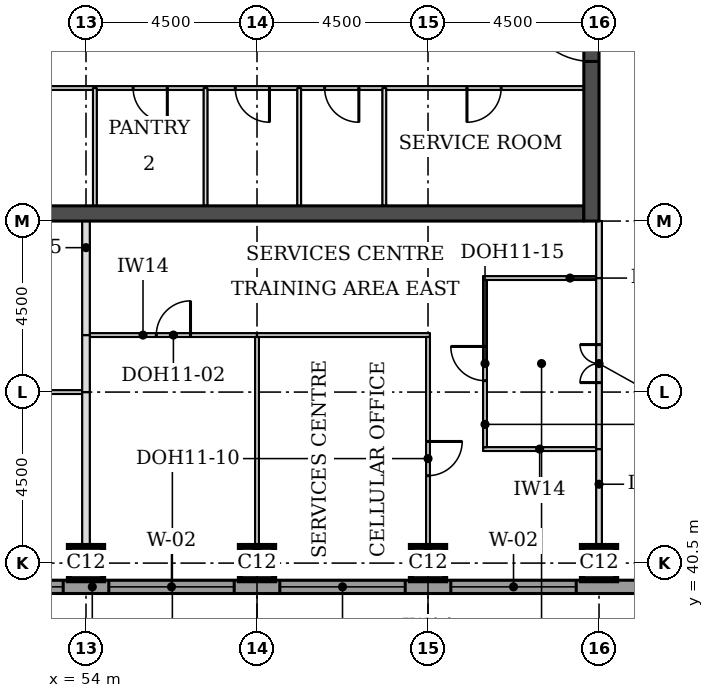
"""IFC4 building model, lengths in metres.
Left out: names, types, materials, properties, quantities, classifications, styles, units other than length and angle.
Written with IfcOpenShell. Run it as: python <this file> out.ifc"""

import sys

from ifc_helpers import new_model, si_unit, direction, frame, frame_2d, origin, origin_2d, place, context, subcontext, project, spatial, rectangle, extrude, element, fill, save


model = new_model("IFC4")
c1 = context("Model", 3, precision=1e-05, world=origin(), true_north=direction((0.0, 1.0)))
c2 = subcontext(c1, "Body", "Model", "MODEL_VIEW")
j1 = project(units=[si_unit("LENGTHUNIT", "METRE"), si_unit("PLANEANGLEUNIT", "RADIAN")], contexts=[c1])
p1 = place(None, origin())
s1 = spatial("IfcSite", under=j1, at=p1, CompositionType="ELEMENT")
p2 = place(p1, origin())
s2 = spatial("IfcBuilding", under=s1, at=p2, CompositionType="ELEMENT")
p3 = place(p2, frame((0.0, 0.0, 234.1)))
s3 = spatial("IfcBuildingStorey", under=s2, at=p3, CompositionType="ELEMENT", Elevation=234.1)
for number, where, z_axis, x_axis in (
    (1, (54.0, 40.5, 0.0), (0.0, 0.0, 1.0), (1.0, 0.0, 0.0)),
    (2, (58.5, 40.5, 0.0), (0.0, 0.0, 1.0), (1.0, 0.0, 0.0)),
    (3, (63.0, 40.5, 0.0), (0.0, 0.0, 1.0), (1.0, 0.0, 0.0)),
    (4, (67.5, 40.5, 0.0), (0.0, 0.0, 1.0), (1.0, 0.0, 0.0)),
):
    element("IfcColumn", number, at=place(p3, frame(where, z_axis=z_axis, x_axis=x_axis)), inside=s3, PredefinedType="COLUMN", context=c2, shape_type="SweptSolid", body=[
        extrude(rectangle(XDim=0.9, YDim=0.9, at=origin_2d()), origin(), (0.0, 0.0, 1.0), 3.7),
    ])
p4 = place(p3, frame((45.4, 49.7, 0.0), z_axis=(0.0, 0.0, 1.0), x_axis=(1.0, 0.0, 0.0)))
e5 = element("IfcWall", 5, at=p4, inside=s3, PredefinedType="SHEAR", context=c2, shape_type="SweptSolid", body=[
    extrude(rectangle(XDim=21.7, YDim=0.4, at=frame_2d((10.85, 0.0))), origin(), (0.0, 0.0, 1.0), 3.7),
])
p5 = place(p3, frame((67.3, 49.5, 0.0), z_axis=(0.0, 0.0, 1.0), x_axis=(0.0, 1.0, 0.0)))
e6 = element("IfcWall", 6, at=p5, inside=s3, PredefinedType="SHEAR", context=c2, shape_type="SweptSolid", body=[
    extrude(rectangle(XDim=22.5, YDim=0.4, at=frame_2d((11.25, 0.0))), origin(), (0.0, 0.0, 1.0), 3.7),
])
p6 = place(p5, frame((4.2, 0.0, 0.0)))
e7 = element("IfcOpeningElement", 7, at=p6, cuts=e6, PredefinedType="OPENING", context=c2, shape_type="SweptSolid", body=[
    extrude(rectangle(XDim=1.8, YDim=2.1, at=frame_2d((0.9, 1.05))), frame((0.0, 0.21, 0.0), z_axis=(0.0, -1.0, 0.0), x_axis=(1.0, 0.0, 0.0)), (0.0, 0.0, 1.0), 0.42),
])
p7 = place(p5, frame((6.9, 0.0, 0.0)))
e8 = element("IfcOpeningElement", 8, at=p7, cuts=e6, PredefinedType="OPENING", context=c2, shape_type="SweptSolid", body=[
    extrude(rectangle(XDim=1.1, YDim=2.1, at=frame_2d((0.55, 1.05))), frame((0.0, 0.21, 0.0), z_axis=(0.0, -1.0, 0.0), x_axis=(1.0, 0.0, 0.0)), (0.0, 0.0, 1.0), 0.42),
])
p8 = place(p5, frame((13.6, 0.0, 0.0)))
e9 = element("IfcOpeningElement", 9, at=p8, cuts=e6, PredefinedType="OPENING", context=c2, shape_type="SweptSolid", body=[
    extrude(rectangle(XDim=1.1, YDim=2.1, at=frame_2d((0.55, 1.05))), frame((0.0, 0.21, 0.0), z_axis=(0.0, -1.0, 0.0), x_axis=(1.0, 0.0, 0.0)), (0.0, 0.0, 1.0), 0.42),
])
p9 = place(p5, frame((16.5, 0.0, 0.0)))
e10 = element("IfcOpeningElement", 10, at=p9, cuts=e6, PredefinedType="OPENING", context=c2, shape_type="SweptSolid", body=[
    extrude(rectangle(XDim=1.8, YDim=2.1, at=frame_2d((0.9, 1.05))), frame((0.0, 0.21, 0.0), z_axis=(0.0, -1.0, 0.0), x_axis=(1.0, 0.0, 0.0)), (0.0, 0.0, 1.0), 0.42),
])
p10 = place(p3, frame((36.0, 39.875, 0.0), z_axis=(0.0, 0.0, 1.0), x_axis=(1.0, 0.0, 0.0)))
e11 = element("IfcWall", 11, at=p10, inside=s3, PredefinedType="STANDARD", context=c2, shape_type="SweptSolid", body=[
    extrude(rectangle(XDim=36.331, YDim=0.35, at=frame_2d((18.166, 0.0))), origin(), (0.0, 0.0, 1.0), 3.525),
])
p11 = place(p10, frame((5.1, 0.0, 0.9)))
e12 = element("IfcOpeningElement", 12, at=p11, cuts=e11, PredefinedType="OPENING", context=c2, shape_type="SweptSolid", body=[
    extrude(rectangle(XDim=3.3, YDim=1.9, at=frame_2d((1.65, 0.95))), frame((0.0, 0.185, 0.0), z_axis=(0.0, -1.0, 0.0), x_axis=(1.0, 0.0, 0.0)), (0.0, 0.0, 1.0), 0.37),
])
p12 = place(p10, frame((9.6, 0.0, 0.9)))
e13 = element("IfcOpeningElement", 13, at=p12, cuts=e11, PredefinedType="OPENING", context=c2, shape_type="SweptSolid", body=[
    extrude(rectangle(XDim=3.3, YDim=1.9, at=frame_2d((1.65, 0.95))), frame((0.0, 0.185, 0.0), z_axis=(0.0, -1.0, 0.0), x_axis=(1.0, 0.0, 0.0)), (0.0, 0.0, 1.0), 0.37),
])
p13 = place(p10, frame((14.1, 0.0, 0.9)))
e14 = element("IfcOpeningElement", 14, at=p13, cuts=e11, PredefinedType="OPENING", context=c2, shape_type="SweptSolid", body=[
    extrude(rectangle(XDim=3.3, YDim=1.9, at=frame_2d((1.65, 0.95))), frame((0.0, 0.185, 0.0), z_axis=(0.0, -1.0, 0.0), x_axis=(1.0, 0.0, 0.0)), (0.0, 0.0, 1.0), 0.37),
])
p14 = place(p10, frame((18.6, 0.0, 0.9)))
e15 = element("IfcOpeningElement", 15, at=p14, cuts=e11, PredefinedType="OPENING", context=c2, shape_type="SweptSolid", body=[
    extrude(rectangle(XDim=3.3, YDim=1.9, at=frame_2d((1.65, 0.95))), frame((0.0, 0.185, 0.0), z_axis=(0.0, -1.0, 0.0), x_axis=(1.0, 0.0, 0.0)), (0.0, 0.0, 1.0), 0.37),
])
p15 = place(p10, frame((23.1, 0.0, 0.9)))
e16 = element("IfcOpeningElement", 16, at=p15, cuts=e11, PredefinedType="OPENING", context=c2, shape_type="SweptSolid", body=[
    extrude(rectangle(XDim=3.3, YDim=1.9, at=frame_2d((1.65, 0.95))), frame((0.0, 0.185, 0.0), z_axis=(0.0, -1.0, 0.0), x_axis=(1.0, 0.0, 0.0)), (0.0, 0.0, 1.0), 0.37),
])
p16 = place(p10, frame((27.6, 0.0, 0.9)))
e17 = element("IfcOpeningElement", 17, at=p16, cuts=e11, PredefinedType="OPENING", context=c2, shape_type="SweptSolid", body=[
    extrude(rectangle(XDim=3.3, YDim=1.9, at=frame_2d((1.65, 0.95))), frame((0.0, 0.185, 0.0), z_axis=(0.0, -1.0, 0.0), x_axis=(1.0, 0.0, 0.0)), (0.0, 0.0, 1.0), 0.37),
])
p17 = place(p3, frame((64.45, 43.5, 0.0), z_axis=(0.0, 0.0, 1.0), x_axis=(1.0, 0.0, 0.0)))
e18 = element("IfcWall", 18, at=p17, inside=s3, PredefinedType="PARTITIONING", context=c2, shape_type="SweptSolid", body=[
    extrude(rectangle(XDim=2.975, YDim=0.1, at=frame_2d((1.488, 0.0))), origin(), (0.0, 0.0, 1.0), 3.55),
])
p18 = place(p3, frame((49.45, 45.0, 0.0), z_axis=(0.0, 0.0, 1.0), x_axis=(1.0, 0.0, 0.0)))
e19 = element("IfcWall", 19, at=p18, inside=s3, PredefinedType="PARTITIONING", context=c2, shape_type="SweptSolid", body=[
    extrude(rectangle(XDim=4.45, YDim=0.1, at=frame_2d((2.225, 0.0))), origin(), (0.0, 0.0, 1.0), 3.55),
])
p19 = place(p3, frame((54.1, 46.5, 0.0), z_axis=(0.0, 0.0, 1.0), x_axis=(1.0, 0.0, 0.0)))
e20 = element("IfcWall", 20, at=p19, inside=s3, PredefinedType="PARTITIONING", context=c2, shape_type="SweptSolid", body=[
    extrude(rectangle(XDim=4.4, YDim=0.1, at=frame_2d((2.2, 0.0))), origin(), (0.0, 0.0, 1.0), 3.55),
])
p20 = place(p19, frame((1.75, 0.0, 0.0)))
e21 = element("IfcOpeningElement", 21, at=p20, cuts=e20, PredefinedType="OPENING", context=c2, shape_type="SweptSolid", body=[
    extrude(rectangle(XDim=0.9, YDim=2.1, at=frame_2d((0.45, 1.05))), frame((0.0, 0.06, 0.0), z_axis=(0.0, -1.0, 0.0), x_axis=(1.0, 0.0, 0.0)), (0.0, 0.0, 1.0), 0.12),
])
p21 = place(p3, frame((58.5, 46.5, 0.0), z_axis=(0.0, 0.0, 1.0), x_axis=(1.0, 0.0, 0.0)))
e22 = element("IfcWall", 22, at=p21, inside=s3, PredefinedType="PARTITIONING", context=c2, shape_type="SweptSolid", body=[
    extrude(rectangle(XDim=4.55, YDim=0.1, at=frame_2d((2.275, 0.0))), origin(), (0.0, 0.0, 1.0), 3.55),
])
p22 = place(p3, frame((64.45, 48.0, 0.0), z_axis=(0.0, 0.0, 1.0), x_axis=(1.0, 0.0, 0.0)))
e23 = element("IfcWall", 23, at=p22, inside=s3, PredefinedType="PARTITIONING", context=c2, shape_type="SweptSolid", body=[
    extrude(rectangle(XDim=2.975, YDim=0.1, at=frame_2d((1.488, 0.0))), origin(), (0.0, 0.0, 1.0), 3.55),
])
p23 = place(p3, frame((54.0, 40.05, 0.0), z_axis=(0.0, 0.0, 1.0), x_axis=(0.0, 1.0, 0.0)))
e24 = element("IfcWall", 24, at=p23, inside=s3, PredefinedType="PARTITIONING", context=c2, shape_type="SweptSolid", body=[
    extrude(rectangle(XDim=4.95, YDim=0.2, at=frame_2d((2.475, 0.0))), origin(), (0.0, 0.0, 1.0), 3.55),
])
p24 = place(p3, frame((58.5, 40.05, 0.0), z_axis=(0.0, 0.0, 1.0), x_axis=(0.0, 1.0, 0.0)))
e25 = element("IfcWall", 25, at=p24, inside=s3, PredefinedType="PARTITIONING", context=c2, shape_type="SweptSolid", body=[
    extrude(rectangle(XDim=6.4, YDim=0.1, at=frame_2d((3.2, 0.0))), origin(), (0.0, 0.0, 1.0), 3.55),
])
p25 = place(p3, frame((63.0, 40.05, 0.0), z_axis=(0.0, 0.0, 1.0), x_axis=(0.0, 1.0, 0.0)))
e26 = element("IfcWall", 26, at=p25, inside=s3, PredefinedType="PARTITIONING", context=c2, shape_type="SweptSolid", body=[
    extrude(rectangle(XDim=6.4, YDim=0.1, at=frame_2d((3.2, 0.0))), origin(), (0.0, 0.0, 1.0), 3.55),
])
p26 = place(p25, frame((2.75, 0.0, 0.0)))
e27 = element("IfcOpeningElement", 27, at=p26, cuts=e26, PredefinedType="OPENING", context=c2, shape_type="SweptSolid", body=[
    extrude(rectangle(XDim=0.9, YDim=2.1, at=frame_2d((0.45, 1.05))), frame((0.0, 0.06, 0.0), z_axis=(0.0, -1.0, 0.0), x_axis=(1.0, 0.0, 0.0)), (0.0, 0.0, 1.0), 0.12),
])
p27 = place(p3, frame((67.5, 40.05, 0.0), z_axis=(0.0, 0.0, 1.0), x_axis=(0.0, 1.0, 0.0)))
e28 = element("IfcWall", 28, at=p27, inside=s3, PredefinedType="PARTITIONING", context=c2, shape_type="SweptSolid", body=[
    extrude(rectangle(XDim=3.45, YDim=0.15, at=frame_2d((1.725, 0.0))), origin(), (0.0, 0.0, 1.0), 3.022),
])
p28 = place(p3, frame((67.5, 43.5, 0.0), z_axis=(0.0, 0.0, 1.0), x_axis=(0.0, 1.0, 0.0)))
e29 = element("IfcWall", 29, at=p28, inside=s3, PredefinedType="PARTITIONING", context=c2, shape_type="SweptSolid", body=[
    extrude(rectangle(XDim=4.5, YDim=0.15, at=frame_2d((2.25, 0.0))), origin(), (0.0, 0.0, 1.0), 3.022),
])
p29 = place(p28, frame((1.75, 0.0, 0.0)))
e30 = element("IfcOpeningElement", 30, at=p29, cuts=e29, PredefinedType="OPENING", context=c2, shape_type="SweptSolid", body=[
    extrude(rectangle(XDim=1.0, YDim=2.1, at=frame_2d((0.5, 1.05))), frame((0.0, 0.085, 0.0), z_axis=(0.0, -1.0, 0.0), x_axis=(1.0, 0.0, 0.0)), (0.0, 0.0, 1.0), 0.17),
])
p30 = place(p3, frame((64.5, 43.55, 0.0), z_axis=(0.0, 0.0, 1.0), x_axis=(0.0, 1.0, 0.0)))
e31 = element("IfcWall", 31, at=p30, inside=s3, PredefinedType="PARTITIONING", context=c2, shape_type="SweptSolid", body=[
    extrude(rectangle(XDim=4.4, YDim=0.1, at=frame_2d((2.2, 0.0))), origin(), (0.0, 0.0, 1.0), 3.55),
])
p31 = place(p30, frame((1.75, 0.0, 0.0)))
e32 = element("IfcOpeningElement", 32, at=p31, cuts=e31, PredefinedType="OPENING", context=c2, shape_type="SweptSolid", body=[
    extrude(rectangle(XDim=0.9, YDim=2.1, at=frame_2d((0.45, 1.05))), frame((0.0, 0.06, 0.0), z_axis=(0.0, -1.0, 0.0), x_axis=(1.0, 0.0, 0.0)), (0.0, 0.0, 1.0), 0.12),
])
p32 = place(p3, frame((54.0, 45.0, 0.0), z_axis=(0.0, 0.0, 1.0), x_axis=(0.0, 1.0, 0.0)))
e33 = element("IfcWall", 33, at=p32, inside=s3, PredefinedType="PARTITIONING", context=c2, shape_type="SweptSolid", body=[
    extrude(rectangle(XDim=1.5, YDim=0.2, at=frame_2d((0.75, 0.0))), origin(), (0.0, 0.0, 1.0), 3.55),
])
p33 = place(p3, frame((54.0, 46.5, 0.0), z_axis=(0.0, 0.0, 1.0), x_axis=(0.0, 1.0, 0.0)))
e34 = element("IfcWall", 34, at=p33, inside=s3, PredefinedType="PARTITIONING", context=c2, shape_type="SweptSolid", body=[
    extrude(rectangle(XDim=3.0, YDim=0.2, at=frame_2d((1.5, 0.0))), origin(), (0.0, 0.0, 1.0), 3.55),
])
p34 = place(p3, frame((67.5, 48.0, 0.0), z_axis=(0.0, 0.0, 1.0), x_axis=(0.0, 1.0, 0.0)))
e35 = element("IfcWall", 35, at=p34, inside=s3, PredefinedType="PARTITIONING", context=c2, shape_type="SweptSolid", body=[
    extrude(rectangle(XDim=1.5, YDim=0.15, at=frame_2d((0.75, 0.0))), origin(), (0.0, 0.0, 1.0), 3.022),
])
p35 = place(p3, frame((45.4, 53.0, 0.0), z_axis=(0.0, 0.0, 1.0), x_axis=(1.0, 0.0, 0.0)))
e36 = element("IfcWall", 36, at=p35, inside=s3, PredefinedType="PARTITIONING", context=c2, shape_type="SweptSolid", body=[
    extrude(rectangle(XDim=21.7, YDim=0.1, at=frame_2d((10.85, 0.0))), origin(), (0.0, 0.0, 1.0), 3.55),
])
p36 = place(p35, frame((18.625, 0.0, 0.0)))
e37 = element("IfcOpeningElement", 37, at=p36, cuts=e36, PredefinedType="OPENING", context=c2, shape_type="SweptSolid", body=[
    extrude(rectangle(XDim=0.9, YDim=2.1, at=frame_2d((0.45, 1.05))), frame((0.0, 0.06, 0.0), z_axis=(0.0, -1.0, 0.0), x_axis=(1.0, 0.0, 0.0)), (0.0, 0.0, 1.0), 0.12),
])
p37 = place(p35, frame((0.393, 0.0, 0.0)))
e38 = element("IfcOpeningElement", 38, at=p37, cuts=e36, PredefinedType="OPENING", context=c2, shape_type="SweptSolid", body=[
    extrude(rectangle(XDim=1.0, YDim=2.1, at=frame_2d((0.5, 1.05))), frame((0.0, 0.06, 0.0), z_axis=(0.0, -1.0, 0.0), x_axis=(1.0, 0.0, 0.0)), (0.0, 0.0, 1.0), 0.12),
])
p38 = place(p35, frame((2.201, 0.0, 0.0)))
e39 = element("IfcOpeningElement", 39, at=p38, cuts=e36, PredefinedType="OPENING", context=c2, shape_type="SweptSolid", body=[
    extrude(rectangle(XDim=0.9, YDim=2.1, at=frame_2d((0.45, 1.05))), frame((0.0, 0.06, 0.0), z_axis=(0.0, -1.0, 0.0), x_axis=(1.0, 0.0, 0.0)), (0.0, 0.0, 1.0), 0.12),
])
p39 = place(p35, frame((3.934, 0.0, 0.0)))
e40 = element("IfcOpeningElement", 40, at=p39, cuts=e36, PredefinedType="OPENING", context=c2, shape_type="SweptSolid", body=[
    extrude(rectangle(XDim=0.9, YDim=2.1, at=frame_2d((0.45, 1.05))), frame((0.0, 0.06, 0.0), z_axis=(0.0, -1.0, 0.0), x_axis=(1.0, 0.0, 0.0)), (0.0, 0.0, 1.0), 0.12),
])
p40 = place(p35, frame((6.592, 0.0, 0.0)))
e41 = element("IfcOpeningElement", 41, at=p40, cuts=e36, PredefinedType="OPENING", context=c2, shape_type="SweptSolid", body=[
    extrude(rectangle(XDim=0.9, YDim=2.1, at=frame_2d((0.45, 1.05))), frame((0.0, 0.06, 0.0), z_axis=(0.0, -1.0, 0.0), x_axis=(1.0, 0.0, 0.0)), (0.0, 0.0, 1.0), 0.12),
])
p41 = place(p35, frame((9.84, 0.0, 0.0)))
e42 = element("IfcOpeningElement", 42, at=p41, cuts=e36, PredefinedType="OPENING", context=c2, shape_type="SweptSolid", body=[
    extrude(rectangle(XDim=0.9, YDim=2.1, at=frame_2d((0.45, 1.05))), frame((0.0, 0.06, 0.0), z_axis=(0.0, -1.0, 0.0), x_axis=(1.0, 0.0, 0.0)), (0.0, 0.0, 1.0), 0.12),
])
p42 = place(p35, frame((12.528, 0.0, 0.0)))
e43 = element("IfcOpeningElement", 43, at=p42, cuts=e36, PredefinedType="OPENING", context=c2, shape_type="SweptSolid", body=[
    extrude(rectangle(XDim=0.9, YDim=2.1, at=frame_2d((0.45, 1.05))), frame((0.0, 0.06, 0.0), z_axis=(0.0, -1.0, 0.0), x_axis=(1.0, 0.0, 0.0)), (0.0, 0.0, 1.0), 0.12),
])
p43 = place(p35, frame((14.88, 0.0, 0.0)))
e44 = element("IfcOpeningElement", 44, at=p43, cuts=e36, PredefinedType="OPENING", context=c2, shape_type="SweptSolid", body=[
    extrude(rectangle(XDim=0.9, YDim=2.1, at=frame_2d((0.45, 1.05))), frame((0.0, 0.06, 0.0), z_axis=(0.0, -1.0, 0.0), x_axis=(1.0, 0.0, 0.0)), (0.0, 0.0, 1.0), 0.12),
])
for number, where, z_axis, x_axis in (
    (45, (54.234, 49.9, 0.0), (0.0, 0.0, 1.0), (0.0, 1.0, 0.0)),
    (46, (57.146, 49.9, 0.0), (0.0, 0.0, 1.0), (0.0, 1.0, 0.0)),
    (47, (59.61, 49.9, 0.0), (0.0, 0.0, 1.0), (0.0, 1.0, 0.0)),
    (48, (61.85, 49.9, 0.0), (0.0, 0.0, 1.0), (0.0, 1.0, 0.0)),
):
    element("IfcWall", number, at=place(p3, frame(where, z_axis=z_axis, x_axis=x_axis)), inside=s3, PredefinedType="PARTITIONING", context=c2, shape_type="SweptSolid", body=[
        extrude(rectangle(XDim=3.1, YDim=0.1, at=frame_2d((1.55, 0.0))), origin(), (0.0, 0.0, 1.0), 3.55),
    ])
p44 = place(p13, origin())
e49 = element("IfcWindow", 49, at=p44, inside=s3, PartitioningType="SINGLE_PANEL", PredefinedType="WINDOW", context=c2, shape_type="SweptSolid", body=[
    extrude(rectangle(XDim=3.3, YDim=1.9, at=frame_2d((1.65, 0.95))), frame((0.0, 0.085, 0.0), z_axis=(0.0, -1.0, 0.0), x_axis=(1.0, 0.0, 0.0)), (0.0, 0.0, 1.0), 0.06),
])
fill(e14, e49)
p45 = place(p14, origin())
e50 = element("IfcWindow", 50, at=p45, inside=s3, PartitioningType="SINGLE_PANEL", PredefinedType="WINDOW", context=c2, shape_type="SweptSolid", body=[
    extrude(rectangle(XDim=3.3, YDim=1.9, at=frame_2d((1.65, 0.95))), frame((0.0, 0.085, 0.0), z_axis=(0.0, -1.0, 0.0), x_axis=(1.0, 0.0, 0.0)), (0.0, 0.0, 1.0), 0.06),
])
fill(e15, e50)
p46 = place(p15, origin())
e51 = element("IfcWindow", 51, at=p46, inside=s3, PartitioningType="SINGLE_PANEL", PredefinedType="WINDOW", context=c2, shape_type="SweptSolid", body=[
    extrude(rectangle(XDim=3.3, YDim=1.9, at=frame_2d((1.65, 0.95))), frame((0.0, 0.085, 0.0), z_axis=(0.0, -1.0, 0.0), x_axis=(1.0, 0.0, 0.0)), (0.0, 0.0, 1.0), 0.06),
])
fill(e16, e51)
p47 = place(p16, origin())
e52 = element("IfcWindow", 52, at=p47, inside=s3, PartitioningType="SINGLE_PANEL", PredefinedType="WINDOW", context=c2, shape_type="SweptSolid", body=[
    extrude(rectangle(XDim=3.3, YDim=1.9, at=frame_2d((1.65, 0.95))), frame((0.0, 0.085, 0.0), z_axis=(0.0, -1.0, 0.0), x_axis=(1.0, 0.0, 0.0)), (0.0, 0.0, 1.0), 0.06),
])
fill(e17, e52)
p48 = place(p29, origin())
e53 = element("IfcDoor", 53, at=p48, inside=s3, OperationType="DOUBLE_DOOR_SINGLE_SWING", PredefinedType="DOOR", context=c2, shape_type="SweptSolid", body=[
    extrude(rectangle(XDim=1.0, YDim=2.1, at=frame_2d((0.5, 1.05))), frame((0.0, 0.025, 0.0), z_axis=(0.0, -1.0, 0.0), x_axis=(1.0, 0.0, 0.0)), (0.0, 0.0, 1.0), 0.05),
])
fill(e30, e53)
p49 = place(p31, origin())
e54 = element("IfcDoor", 54, at=p49, inside=s3, OperationType="SINGLE_SWING_RIGHT", PredefinedType="DOOR", context=c2, shape_type="SweptSolid", body=[
    extrude(rectangle(XDim=0.9, YDim=2.1, at=frame_2d((0.45, 1.05))), frame((0.0, 0.025, 0.0), z_axis=(0.0, -1.0, 0.0), x_axis=(1.0, 0.0, 0.0)), (0.0, 0.0, 1.0), 0.05),
])
fill(e32, e54)
p50 = place(p20, origin())
e55 = element("IfcDoor", 55, at=p50, inside=s3, OperationType="SINGLE_SWING_RIGHT", PredefinedType="DOOR", context=c2, shape_type="SweptSolid", body=[
    extrude(rectangle(XDim=0.9, YDim=2.1, at=frame_2d((0.45, 1.05))), frame((0.0, 0.025, 0.0), z_axis=(0.0, -1.0, 0.0), x_axis=(1.0, 0.0, 0.0)), (0.0, 0.0, 1.0), 0.05),
])
fill(e21, e55)
p51 = place(p26, frame((0.9, 0.0, 0.0), z_axis=(0.0, 0.0, 1.0), x_axis=(-1.0, 0.0, 0.0)))
e56 = element("IfcDoor", 56, at=p51, inside=s3, OperationType="SINGLE_SWING_LEFT", PredefinedType="DOOR", context=c2, shape_type="SweptSolid", body=[
    extrude(rectangle(XDim=0.9, YDim=2.1, at=frame_2d((0.45, 1.05))), frame((0.0, 0.025, 0.0), z_axis=(0.0, -1.0, 0.0), x_axis=(1.0, 0.0, 0.0)), (0.0, 0.0, 1.0), 0.05),
])
fill(e27, e56)
p52 = place(p6, origin())
e57 = element("IfcDoor", 57, at=p52, inside=s3, OperationType="SINGLE_SWING_RIGHT", PredefinedType="DOOR", context=c2, shape_type="SweptSolid", body=[
    extrude(rectangle(XDim=1.8, YDim=2.1, at=frame_2d((0.9, 1.05))), frame((0.0, 0.025, 0.0), z_axis=(0.0, -1.0, 0.0), x_axis=(1.0, 0.0, 0.0)), (0.0, 0.0, 1.0), 0.05),
])
fill(e7, e57)
p53 = place(p36, frame((0.9, 0.0, 0.0), z_axis=(0.0, 0.0, 1.0), x_axis=(-1.0, 0.0, 0.0)))
e58 = element("IfcDoor", 58, at=p53, inside=s3, OperationType="SINGLE_SWING_RIGHT", PredefinedType="DOOR", context=c2, shape_type="SweptSolid", body=[
    extrude(rectangle(XDim=0.9, YDim=2.1, at=frame_2d((0.45, 1.05))), frame((0.0, 0.025, 0.0), z_axis=(0.0, -1.0, 0.0), x_axis=(1.0, 0.0, 0.0)), (0.0, 0.0, 1.0), 0.05),
])
fill(e37, e58)
p54 = place(p41, frame((0.9, 0.0, 0.0), z_axis=(0.0, 0.0, 1.0), x_axis=(-1.0, 0.0, 0.0)))
e59 = element("IfcDoor", 59, at=p54, inside=s3, OperationType="SINGLE_SWING_LEFT", PredefinedType="DOOR", context=c2, shape_type="SweptSolid", body=[
    extrude(rectangle(XDim=0.9, YDim=2.1, at=frame_2d((0.45, 1.05))), frame((0.0, 0.025, 0.0), z_axis=(0.0, -1.0, 0.0), x_axis=(1.0, 0.0, 0.0)), (0.0, 0.0, 1.0), 0.05),
])
fill(e42, e59)
p55 = place(p42, frame((0.9, 0.0, 0.0), z_axis=(0.0, 0.0, 1.0), x_axis=(-1.0, 0.0, 0.0)))
e60 = element("IfcDoor", 60, at=p55, inside=s3, OperationType="SINGLE_SWING_LEFT", PredefinedType="DOOR", context=c2, shape_type="SweptSolid", body=[
    extrude(rectangle(XDim=0.9, YDim=2.1, at=frame_2d((0.45, 1.05))), frame((0.0, 0.025, 0.0), z_axis=(0.0, -1.0, 0.0), x_axis=(1.0, 0.0, 0.0)), (0.0, 0.0, 1.0), 0.05),
])
fill(e43, e60)
p56 = place(p43, frame((0.9, 0.0, 0.0), z_axis=(0.0, 0.0, 1.0), x_axis=(-1.0, 0.0, 0.0)))
e61 = element("IfcDoor", 61, at=p56, inside=s3, OperationType="SINGLE_SWING_LEFT", PredefinedType="DOOR", context=c2, shape_type="SweptSolid", body=[
    extrude(rectangle(XDim=0.9, YDim=2.1, at=frame_2d((0.45, 1.05))), frame((0.0, 0.025, 0.0), z_axis=(0.0, -1.0, 0.0), x_axis=(1.0, 0.0, 0.0)), (0.0, 0.0, 1.0), 0.05),
])
fill(e44, e61)
save(model, sys.argv[1])
